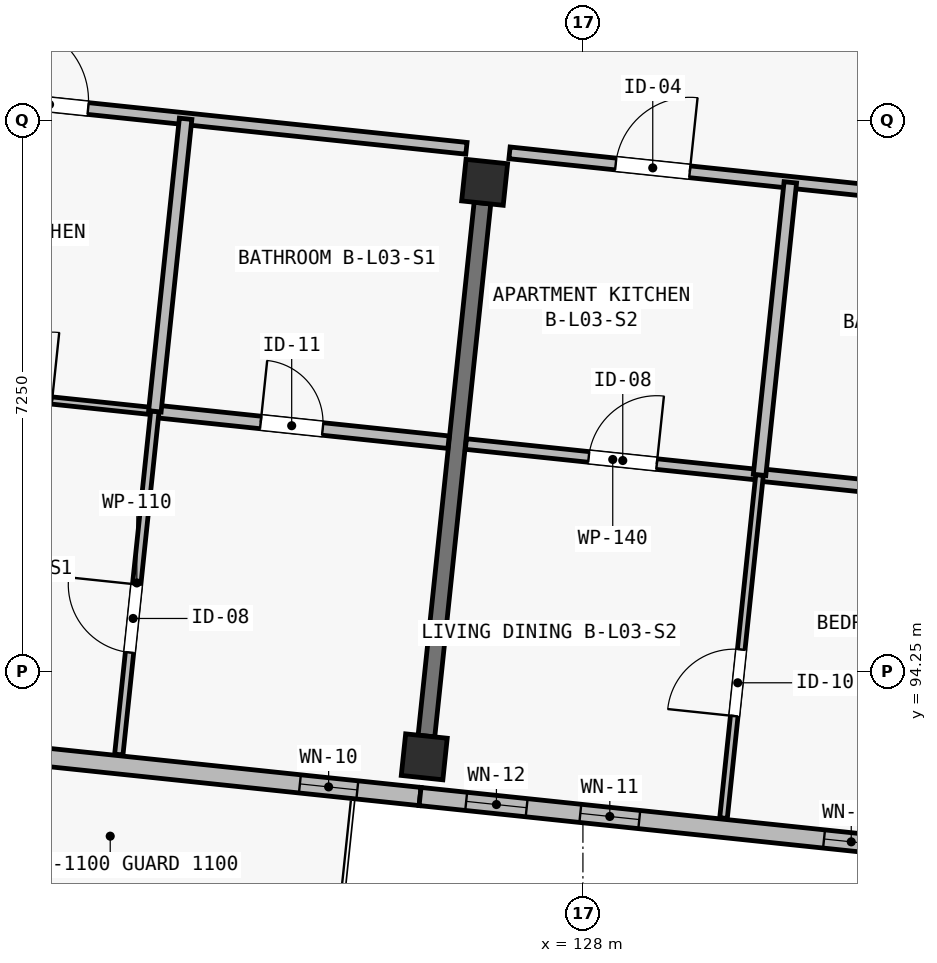
"""IFC4 building model, lengths in metres.
Left out: names, types, materials, properties, quantities, classifications, styles, units other than length and angle.
Written with IfcOpenShell. Run it as: python <this file> out.ifc"""

import sys

from ifc_helpers import new_model, si_unit, direction, frame, frame_2d, origin, origin_2d, place, context, subcontext, project, spatial, rectangle, extrude, element, fill, save


model = new_model("IFC4")
c1 = context("Model", 3, precision=1e-05, world=origin(), true_north=direction((0.0, 1.0)))
c2 = subcontext(c1, "Body", "Model", "MODEL_VIEW")
j1 = project(units=[si_unit("LENGTHUNIT", "METRE"), si_unit("PLANEANGLEUNIT", "RADIAN")], contexts=[c1])
p1 = place(None, origin())
s1 = spatial("IfcSite", under=j1, at=p1, CompositionType="ELEMENT")
p2 = place(p1, origin())
s2 = spatial("IfcBuilding", under=s1, at=p2, CompositionType="ELEMENT")
p3 = place(p2, frame((0.0, 0.0, 11.65)))
s3 = spatial("IfcBuildingStorey", under=s2, at=p3, CompositionType="ELEMENT", Elevation=11.65)
for number, where, z_axis, x_axis in (
    (1, (125.912, 93.127, 0.0), (0.0, 0.0, 1.0), (0.995, -0.105, 0.0)),
    (2, (126.707, 100.686, 0.0), (0.0, 0.0, 1.0), (0.995, -0.105, 0.0)),
):
    element("IfcColumn", number, at=place(p3, frame(where, z_axis=z_axis, x_axis=x_axis)), inside=s3, PredefinedType="COLUMN", context=c2, shape_type="SweptSolid", body=[
        extrude(rectangle(XDim=0.55, YDim=0.55, at=origin_2d()), origin(), (0.0, 0.0, 1.0), 3.25),
    ])
p4 = place(p3, frame((125.941, 93.401, 0.0), z_axis=(0.0, 0.0, 1.0), x_axis=(0.104515329964, 0.994523275646, 0.0)))
e3 = element("IfcWall", 3, at=p4, inside=s3, PredefinedType="SHEAR", context=c2, shape_type="SweptSolid", body=[
    extrude(rectangle(XDim=7.05, YDim=0.22, at=frame_2d((3.525, 0.0))), origin(), (0.0, 0.0, 1.0), 2.5),
])
p5 = place(p3, frame((125.857, 92.605, 0.0), z_axis=(0.0, 0.0, 1.0), x_axis=(-0.994522329422, 0.104524333444, 0.0)))
e4 = element("IfcWall", 4, at=p5, inside=s3, PredefinedType="SOLIDWALL", context=c2, shape_type="SweptSolid", body=[
    extrude(rectangle(XDim=8.0, YDim=0.24, at=frame_2d((4.0, 0.0))), origin(), (0.0, 0.0, 1.0), 3.0),
])
p6 = place(p5, frame((5.495, 0.0, 0.0)))
e5 = element("IfcOpeningElement", 5, at=p6, cuts=e4, PredefinedType="OPENING", context=c2, shape_type="SweptSolid", body=[
    extrude(rectangle(XDim=1.5, YDim=2.12, at=frame_2d((0.75, 1.06))), frame((0.0, 0.135, 0.0), z_axis=(0.0, -1.0, 0.0), x_axis=(1.0, 0.0, 0.0)), (0.0, 0.0, 1.0), 0.27),
])
p7 = place(p5, frame((0.83, 0.0, 0.46)))
e6 = element("IfcOpeningElement", 6, at=p7, cuts=e4, PredefinedType="OPENING", context=c2, shape_type="SweptSolid", body=[
    extrude(rectangle(XDim=0.76, YDim=2.34, at=frame_2d((0.38, 1.17))), frame((0.0, 0.135, 0.0), z_axis=(0.0, -1.0, 0.0), x_axis=(1.0, 0.0, 0.0)), (0.0, 0.0, 1.0), 0.27),
])
p8 = place(p3, frame((133.814, 91.769, 0.0), z_axis=(0.0, 0.0, 1.0), x_axis=(-0.994522662826, 0.104521161134, 0.0)))
e7 = element("IfcWall", 7, at=p8, inside=s3, PredefinedType="SOLIDWALL", context=c2, shape_type="SweptSolid", body=[
    extrude(rectangle(XDim=8.0, YDim=0.24, at=frame_2d((4.0, 0.0))), origin(), (0.0, 0.0, 1.0), 3.0),
])
p9 = place(p8, frame((1.936, 0.0, 0.52)))
e8 = element("IfcOpeningElement", 8, at=p9, cuts=e7, PredefinedType="OPENING", context=c2, shape_type="SweptSolid", body=[
    extrude(rectangle(XDim=0.72, YDim=2.16, at=frame_2d((0.36, 1.08))), frame((0.0, 0.135, 0.0), z_axis=(0.0, -1.0, 0.0), x_axis=(1.0, 0.0, 0.0)), (0.0, 0.0, 1.0), 0.27),
])
p10 = place(p8, frame((5.1, 0.0, 0.52)))
e9 = element("IfcOpeningElement", 9, at=p10, cuts=e7, PredefinedType="OPENING", context=c2, shape_type="SweptSolid", body=[
    extrude(rectangle(XDim=0.78, YDim=2.2, at=frame_2d((0.39, 1.1))), frame((0.0, 0.135, 0.0), z_axis=(0.0, -1.0, 0.0), x_axis=(1.0, 0.0, 0.0)), (0.0, 0.0, 1.0), 0.27),
])
p11 = place(p8, frame((6.59, 0.0, 0.42)))
e10 = element("IfcOpeningElement", 10, at=p11, cuts=e7, PredefinedType="OPENING", context=c2, shape_type="SweptSolid", body=[
    extrude(rectangle(XDim=0.8, YDim=2.3, at=frame_2d((0.4, 1.15))), frame((0.0, 0.135, 0.0), z_axis=(0.0, -1.0, 0.0), x_axis=(1.0, 0.0, 0.0)), (0.0, 0.0, 1.0), 0.27),
])
p12 = place(p3, frame((119.078, 101.91, 0.0), z_axis=(0.0, 0.0, 1.0), x_axis=(0.99451912784, -0.104554791185, 0.0)))
e11 = element("IfcWall", 11, at=p12, inside=s3, PredefinedType="PARTITIONING", context=c2, shape_type="SweptSolid", body=[
    extrude(rectangle(XDim=7.43, YDim=0.155, at=frame_2d((3.715, 0.0))), origin(), (0.0, 0.0, 1.0), 2.97),
])
p13 = place(p12, frame((1.405, 0.0, 0.0)))
e12 = element("IfcOpeningElement", 12, at=p13, cuts=e11, PredefinedType="OPENING", context=c2, shape_type="SweptSolid", body=[
    extrude(rectangle(XDim=1.02, YDim=2.2, at=frame_2d((0.51, 1.1))), frame((0.0, 0.093, 0.0), z_axis=(0.0, -1.0, 0.0), x_axis=(1.0, 0.0, 0.0)), (0.0, 0.0, 1.0), 0.185),
])
p14 = place(p3, frame((118.504, 98.079, 0.0), z_axis=(0.0, 0.0, 1.0), x_axis=(0.994517841934, -0.104567021925, 0.0)))
e13 = element("IfcWall", 13, at=p14, inside=s3, PredefinedType="PARTITIONING", context=c2, shape_type="SweptSolid", body=[
    extrude(rectangle(XDim=3.885, YDim=0.095, at=frame_2d((1.942, 0.0))), origin(), (0.0, 0.0, 1.0), 2.97),
])
p15 = place(p14, frame((1.625, 0.0, 0.0)))
e14 = element("IfcOpeningElement", 14, at=p15, cuts=e13, PredefinedType="OPENING", context=c2, shape_type="SweptSolid", body=[
    extrude(rectangle(XDim=0.9, YDim=2.1, at=frame_2d((0.45, 1.05))), frame((0.0, 0.062, 0.0), z_axis=(0.0, -1.0, 0.0), x_axis=(1.0, 0.0, 0.0)), (0.0, 0.0, 1.0), 0.125),
])
p16 = place(p3, frame((122.368, 97.673, 0.0), z_axis=(0.0, 0.0, 1.0), x_axis=(0.994523688713, -0.104511399326, 0.0)))
e15 = element("IfcWall", 15, at=p16, inside=s3, PredefinedType="PLUMBINGWALL", context=c2, shape_type="SweptSolid", body=[
    extrude(rectangle(XDim=3.885, YDim=0.165, at=frame_2d((1.942, 0.0))), origin(), (0.0, 0.0, 1.0), 2.97),
])
p17 = place(p16, frame((1.4, 0.0, 0.0)))
e16 = element("IfcOpeningElement", 16, at=p17, cuts=e15, PredefinedType="OPENING", context=c2, shape_type="SweptSolid", body=[
    extrude(rectangle(XDim=0.82, YDim=2.08, at=frame_2d((0.41, 1.04))), frame((0.0, 0.097, 0.0), z_axis=(0.0, -1.0, 0.0), x_axis=(1.0, 0.0, 0.0)), (0.0, 0.0, 1.0), 0.195),
])
p18 = place(p3, frame((121.894, 93.158, 0.0), z_axis=(0.0, 0.0, 1.0), x_axis=(0.104539221709, 0.994520764552, 0.0)))
e17 = element("IfcWall", 17, at=p18, inside=s3, PredefinedType="PARTITIONING", context=c2, shape_type="SweptSolid", body=[
    extrude(rectangle(XDim=4.54, YDim=0.11, at=frame_2d((2.27, 0.0))), origin(), (0.0, 0.0, 1.0), 2.97),
])
p19 = place(p18, frame((1.35, 0.0, 0.0)))
e18 = element("IfcOpeningElement", 18, at=p19, cuts=e17, PredefinedType="OPENING", context=c2, shape_type="SweptSolid", body=[
    extrude(rectangle(XDim=0.9, YDim=2.1, at=frame_2d((0.45, 1.05))), frame((0.0, 0.07, 0.0), z_axis=(0.0, -1.0, 0.0), x_axis=(1.0, 0.0, 0.0)), (0.0, 0.0, 1.0), 0.14),
])
p20 = place(p3, frame((122.368, 97.673, 0.0), z_axis=(0.0, 0.0, 1.0), x_axis=(0.104468047647, 0.994528243451, 0.0)))
e19 = element("IfcWall", 19, at=p20, inside=s3, PredefinedType="PLUMBINGWALL", context=c2, shape_type="SweptSolid", body=[
    extrude(rectangle(XDim=3.87, YDim=0.165, at=frame_2d((1.935, 0.0))), origin(), (0.0, 0.0, 1.0), 2.97),
])
p21 = place(p3, frame((127.034, 101.074, 0.0), z_axis=(0.0, 0.0, 1.0), x_axis=(0.994522184982, -0.104525707739, 0.0)))
e20 = element("IfcWall", 20, at=p21, inside=s3, PredefinedType="PARTITIONING", context=c2, shape_type="SweptSolid", body=[
    extrude(rectangle(XDim=7.43, YDim=0.155, at=frame_2d((3.715, 0.0))), origin(), (0.0, 0.0, 1.0), 2.97),
])
p22 = place(p21, frame((1.405, 0.0, 0.0)))
e21 = element("IfcOpeningElement", 21, at=p22, cuts=e20, PredefinedType="OPENING", context=c2, shape_type="SweptSolid", body=[
    extrude(rectangle(XDim=0.98, YDim=2.15, at=frame_2d((0.49, 1.075))), frame((0.0, 0.093, 0.0), z_axis=(0.0, -1.0, 0.0), x_axis=(1.0, 0.0, 0.0)), (0.0, 0.0, 1.0), 0.185),
])
p23 = place(p3, frame((126.46, 97.243, 0.0), z_axis=(0.0, 0.0, 1.0), x_axis=(0.994524375082, -0.104504867671, 0.0)))
e22 = element("IfcWall", 22, at=p23, inside=s3, PredefinedType="PARTITIONING", context=c2, shape_type="SweptSolid", body=[
    extrude(rectangle(XDim=3.885, YDim=0.14, at=frame_2d((1.942, 0.0))), origin(), (0.0, 0.0, 1.0), 2.97),
])
p24 = place(p23, frame((1.625, 0.0, 0.0)))
e23 = element("IfcOpeningElement", 23, at=p24, cuts=e22, PredefinedType="OPENING", context=c2, shape_type="SweptSolid", body=[
    extrude(rectangle(XDim=0.9, YDim=2.1, at=frame_2d((0.45, 1.05))), frame((0.0, 0.085, 0.0), z_axis=(0.0, -1.0, 0.0), x_axis=(1.0, 0.0, 0.0)), (0.0, 0.0, 1.0), 0.17),
])
p25 = place(p3, frame((130.324, 96.837, 0.0), z_axis=(0.0, 0.0, 1.0), x_axis=(0.994524375082, -0.104504867671, 0.0)))
e24 = element("IfcWall", 24, at=p25, inside=s3, PredefinedType="PLUMBINGWALL", context=c2, shape_type="SweptSolid", body=[
    extrude(rectangle(XDim=3.885, YDim=0.165, at=frame_2d((1.942, 0.0))), origin(), (0.0, 0.0, 1.0), 2.97),
])
p26 = place(p25, frame((1.4, 0.0, 0.0)))
e25 = element("IfcOpeningElement", 25, at=p26, cuts=e24, PredefinedType="OPENING", context=c2, shape_type="SweptSolid", body=[
    extrude(rectangle(XDim=0.82, YDim=2.08, at=frame_2d((0.41, 1.04))), frame((0.0, 0.097, 0.0), z_axis=(0.0, -1.0, 0.0), x_axis=(1.0, 0.0, 0.0)), (0.0, 0.0, 1.0), 0.195),
])
p27 = place(p3, frame((129.85, 92.322, 0.0), z_axis=(0.0, 0.0, 1.0), x_axis=(0.104539221709, 0.994520764552, 0.0)))
e26 = element("IfcWall", 26, at=p27, inside=s3, PredefinedType="PARTITIONING", context=c2, shape_type="SweptSolid", body=[
    extrude(rectangle(XDim=4.54, YDim=0.1, at=frame_2d((2.27, 0.0))), origin(), (0.0, 0.0, 1.0), 2.97),
])
p28 = place(p27, frame((1.35, 0.0, 0.0)))
e27 = element("IfcOpeningElement", 27, at=p28, cuts=e26, PredefinedType="OPENING", context=c2, shape_type="SweptSolid", body=[
    extrude(rectangle(XDim=0.88, YDim=2.1, at=frame_2d((0.44, 1.05))), frame((0.0, 0.065, 0.0), z_axis=(0.0, -1.0, 0.0), x_axis=(1.0, 0.0, 0.0)), (0.0, 0.0, 1.0), 0.13),
])
p29 = place(p3, frame((130.324, 96.837, 0.0), z_axis=(0.0, 0.0, 1.0), x_axis=(0.104530443122, 0.994521687275, 0.0)))
e28 = element("IfcWall", 28, at=p29, inside=s3, PredefinedType="PLUMBINGWALL", context=c2, shape_type="SweptSolid", body=[
    extrude(rectangle(XDim=3.87, YDim=0.165, at=frame_2d((1.935, 0.0))), origin(), (0.0, 0.0, 1.0), 2.97),
])
p30 = place(p3, frame((127.358, 103.151, 0.0), z_axis=(0.0, 0.0, 1.0), x_axis=(0.994522671024, -0.104521083137, 0.0)))
e29 = element("IfcWall", 29, at=p30, inside=s3, PredefinedType="PARTITIONING", context=c2, shape_type="SweptSolid", body=[
    extrude(rectangle(XDim=7.22, YDim=0.155, at=frame_2d((3.61, 0.0))), origin(), (0.0, 0.0, 1.0), 2.97),
])
p31 = place(p30, frame((1.305, 0.0, 0.0)))
e30 = element("IfcOpeningElement", 30, at=p31, cuts=e29, PredefinedType="OPENING", context=c2, shape_type="SweptSolid", body=[
    extrude(rectangle(XDim=0.98, YDim=2.15, at=frame_2d((0.49, 1.075))), frame((0.0, 0.093, 0.0), z_axis=(0.0, -1.0, 0.0), x_axis=(1.0, 0.0, 0.0)), (0.0, 0.0, 1.0), 0.185),
])
p32 = place(p7, origin())
e31 = element("IfcWindow", 31, at=p32, inside=s3, PartitioningType="SINGLE_PANEL", PredefinedType="WINDOW", context=c2, shape_type="SweptSolid", body=[
    extrude(rectangle(XDim=0.76, YDim=2.34, at=frame_2d((0.38, 1.17))), frame((0.0, 0.03, 0.0), z_axis=(0.0, -1.0, 0.0), x_axis=(1.0, 0.0, 0.0)), (0.0, 0.0, 1.0), 0.06),
])
fill(e6, e31)
p33 = place(p9, origin())
e32 = element("IfcWindow", 32, at=p33, inside=s3, PartitioningType="SINGLE_PANEL", PredefinedType="WINDOW", context=c2, shape_type="SweptSolid", body=[
    extrude(rectangle(XDim=0.72, YDim=2.16, at=frame_2d((0.36, 1.08))), frame((0.0, 0.03, 0.0), z_axis=(0.0, -1.0, 0.0), x_axis=(1.0, 0.0, 0.0)), (0.0, 0.0, 1.0), 0.06),
])
fill(e8, e32)
p34 = place(p10, origin())
e33 = element("IfcWindow", 33, at=p34, inside=s3, PartitioningType="SINGLE_PANEL", PredefinedType="WINDOW", context=c2, shape_type="SweptSolid", body=[
    extrude(rectangle(XDim=0.78, YDim=2.2, at=frame_2d((0.39, 1.1))), frame((0.0, 0.03, 0.0), z_axis=(0.0, -1.0, 0.0), x_axis=(1.0, 0.0, 0.0)), (0.0, 0.0, 1.0), 0.06),
])
fill(e9, e33)
p35 = place(p11, origin())
e34 = element("IfcWindow", 34, at=p35, inside=s3, PartitioningType="SINGLE_PANEL", PredefinedType="WINDOW", context=c2, shape_type="SweptSolid", body=[
    extrude(rectangle(XDim=0.8, YDim=2.3, at=frame_2d((0.4, 1.15))), frame((0.0, 0.03, 0.0), z_axis=(0.0, -1.0, 0.0), x_axis=(1.0, 0.0, 0.0)), (0.0, 0.0, 1.0), 0.06),
])
fill(e10, e34)
p36 = place(p13, origin())
e35 = element("IfcDoor", 35, at=p36, inside=s3, OperationType="SINGLE_SWING_LEFT", PredefinedType="DOOR", context=c2, shape_type="SweptSolid", body=[
    extrude(rectangle(XDim=1.02, YDim=2.2, at=frame_2d((0.51, 1.1))), frame((0.0, 0.025, 0.0), z_axis=(0.0, -1.0, 0.0), x_axis=(1.0, 0.0, 0.0)), (0.0, 0.0, 1.0), 0.05),
])
fill(e12, e35)
p37 = place(p15, origin())
e36 = element("IfcDoor", 36, at=p37, inside=s3, OperationType="SINGLE_SWING_RIGHT", PredefinedType="DOOR", context=c2, shape_type="SweptSolid", body=[
    extrude(rectangle(XDim=0.9, YDim=2.1, at=frame_2d((0.45, 1.05))), frame((0.0, 0.025, 0.0), z_axis=(0.0, -1.0, 0.0), x_axis=(1.0, 0.0, 0.0)), (0.0, 0.0, 1.0), 0.05),
])
fill(e14, e36)
p38 = place(p17, origin())
e37 = element("IfcDoor", 37, at=p38, inside=s3, OperationType="SINGLE_SWING_LEFT", PredefinedType="DOOR", context=c2, shape_type="SweptSolid", body=[
    extrude(rectangle(XDim=0.82, YDim=2.08, at=frame_2d((0.41, 1.04))), frame((0.0, 0.025, 0.0), z_axis=(0.0, -1.0, 0.0), x_axis=(1.0, 0.0, 0.0)), (0.0, 0.0, 1.0), 0.05),
])
fill(e16, e37)
p39 = place(p19, origin())
e38 = element("IfcDoor", 38, at=p39, inside=s3, OperationType="SINGLE_SWING_RIGHT", PredefinedType="DOOR", context=c2, shape_type="SweptSolid", body=[
    extrude(rectangle(XDim=0.9, YDim=2.1, at=frame_2d((0.45, 1.05))), frame((0.0, 0.025, 0.0), z_axis=(0.0, -1.0, 0.0), x_axis=(1.0, 0.0, 0.0)), (0.0, 0.0, 1.0), 0.05),
])
fill(e18, e38)
p40 = place(p22, origin())
e39 = element("IfcDoor", 39, at=p40, inside=s3, OperationType="SINGLE_SWING_RIGHT", PredefinedType="DOOR", context=c2, shape_type="SweptSolid", body=[
    extrude(rectangle(XDim=0.98, YDim=2.15, at=frame_2d((0.49, 1.075))), frame((0.0, 0.025, 0.0), z_axis=(0.0, -1.0, 0.0), x_axis=(1.0, 0.0, 0.0)), (0.0, 0.0, 1.0), 0.05),
])
fill(e21, e39)
p41 = place(p24, origin())
e40 = element("IfcDoor", 40, at=p41, inside=s3, OperationType="SINGLE_SWING_RIGHT", PredefinedType="DOOR", context=c2, shape_type="SweptSolid", body=[
    extrude(rectangle(XDim=0.9, YDim=2.1, at=frame_2d((0.45, 1.05))), frame((0.0, 0.025, 0.0), z_axis=(0.0, -1.0, 0.0), x_axis=(1.0, 0.0, 0.0)), (0.0, 0.0, 1.0), 0.05),
])
fill(e23, e40)
p42 = place(p28, origin())
e41 = element("IfcDoor", 41, at=p42, inside=s3, OperationType="SINGLE_SWING_LEFT", PredefinedType="DOOR", context=c2, shape_type="SweptSolid", body=[
    extrude(rectangle(XDim=0.88, YDim=2.1, at=frame_2d((0.44, 1.05))), frame((0.0, 0.025, 0.0), z_axis=(0.0, -1.0, 0.0), x_axis=(1.0, 0.0, 0.0)), (0.0, 0.0, 1.0), 0.05),
])
fill(e27, e41)
save(model, sys.argv[1])
